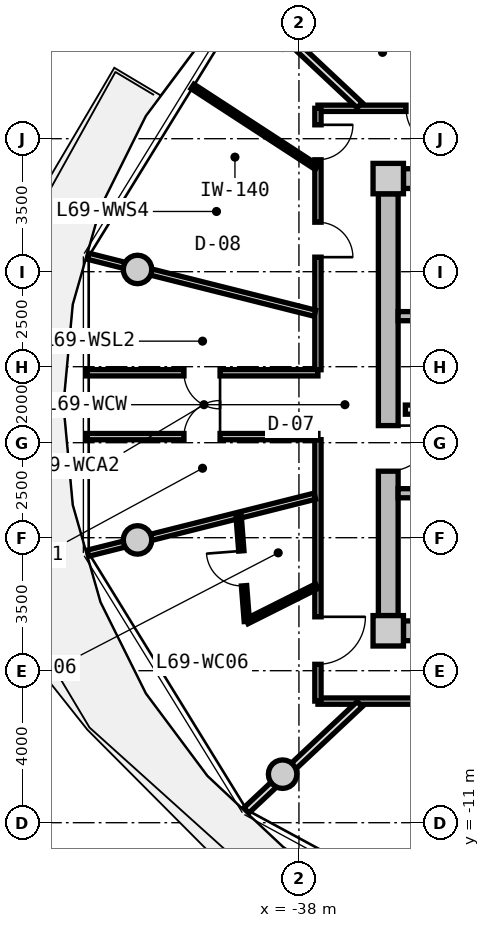
"""IFC4 building model, lengths in metres.
Left out: names, types, materials, properties, quantities, classifications, styles, units other than length and angle.
Written with IfcOpenShell. Run it as: python <this file> out.ifc"""

import sys

from ifc_helpers import new_model, si_unit, direction, frame, frame_2d, origin, origin_2d, place, context, subcontext, project, spatial, rectangle, circle, extrude, source, transform, mapped, element, fill, save


model = new_model("IFC4")
c1 = context("Model", 3, precision=1e-05, world=origin(), true_north=direction((0.0, 1.0)))
c2 = subcontext(c1, "Body", "Model", "MODEL_VIEW")
j1 = project(units=[si_unit("LENGTHUNIT", "METRE"), si_unit("PLANEANGLEUNIT", "RADIAN")], contexts=[c1])
p1 = place(None, origin())
s1 = spatial("IfcSite", under=j1, at=p1, CompositionType="ELEMENT")
p2 = place(p1, origin())
s2 = spatial("IfcBuilding", under=s1, at=p2, CompositionType="ELEMENT")
p3 = place(p2, frame((0.0, 0.0, 223.05)))
s3 = spatial("IfcBuildingStorey", under=s2, at=p3, CompositionType="ELEMENT", Elevation=223.05)
m1 = source(origin(), c2, "Body", "SweptSolid", [
    extrude(rectangle(XDim=0.8, YDim=0.8, at=origin_2d()), origin(), (0.0, 0.0, 1.0), 3.05),
])
for number, where, z_axis, x_axis in (
    (1, (-35.65, -5.95, 0.0), (0.0, 0.0, 1.0), (1.0, 0.0, 0.0)),
    (2, (-35.65, 5.95, 0.0), (0.0, 0.0, 1.0), (1.0, 0.0, 0.0)),
):
    element("IfcColumn", number, at=place(p3, frame(where, z_axis=z_axis, x_axis=x_axis)), inside=s3, PredefinedType="COLUMN", context=c2, shape_type="MappedRepresentation", body=[
        mapped(m1, transform((0.0, 0.0, 0.0), x_axis=(1.0, 0.0, 0.0), y_axis=(0.0, 1.0, 0.0), z_axis=(0.0, 0.0, 1.0), scale=1.0)),
    ])
m2 = source(origin(), c2, "Body", "SweptSolid", [
    extrude(rectangle(XDim=14.5, YDim=0.52, at=frame_2d((7.25, 0.0))), origin(), (0.0, 0.0, 1.0), 2.76),
])
for number, where, z_axis, x_axis in (
    (3, (-35.25, 5.95, 0.0), (0.0, 0.0, 1.0), (1.0, 0.0, 0.0)),
    (4, (-20.75, -5.95, 0.0), (0.0, 0.0, 1.0), (-1.0, 0.0, 0.0)),
):
    element("IfcWall", number, at=place(p3, frame(where, z_axis=z_axis, x_axis=x_axis)), inside=s3, PredefinedType="SHEAR", context=c2, shape_type="MappedRepresentation", body=[
        mapped(m2, transform((0.0, 0.0, 0.0), x_axis=(1.0, 0.0, 0.0), y_axis=(0.0, 1.0, 0.0), z_axis=(0.0, 0.0, 1.0), scale=1.0)),
    ])
m3 = source(origin(), c2, "Body", "SweptSolid", [
    extrude(rectangle(XDim=11.1, YDim=0.52, at=frame_2d((5.55, 0.0))), origin(), (0.0, 0.0, 1.0), 2.76),
])
p4 = place(p3, frame((-35.65, -5.55, 0.0), z_axis=(0.0, 0.0, 1.0), x_axis=(0.0, 1.0, 0.0)))
e5 = element("IfcWall", 5, at=p4, inside=s3, PredefinedType="SHEAR", context=c2, shape_type="MappedRepresentation", body=[
    mapped(m3, transform((0.0, 0.0, 0.0), x_axis=(1.0, 0.0, 0.0), y_axis=(0.0, 1.0, 0.0), z_axis=(0.0, 0.0, 1.0), scale=1.0)),
])
p5 = place(p4, frame((3.8, 0.0, 0.0)))
e6 = element("IfcOpeningElement", 6, at=p5, cuts=e5, PredefinedType="OPENING", context=c2, shape_type="SweptSolid", body=[
    extrude(rectangle(XDim=1.2, YDim=2.15, at=frame_2d((0.6, 1.075))), frame((0.0, 0.27, 0.0), z_axis=(0.0, -1.0, 0.0), x_axis=(1.0, 0.0, 0.0)), (0.0, 0.0, 1.0), 0.54),
])
m4 = source(origin(), c2, "Body", "SweptSolid", [
    extrude(circle(Radius=0.375, at=origin_2d()), origin(), (0.0, 0.0, 1.0), 3.05),
])
for number, where, z_axis, x_axis in (
    (7, (-42.247, 3.559, 0.0), (0.0, 0.0, 1.0), (1.0, 0.0, 0.0)),
    (8, (-42.247, -3.559, 0.0), (0.0, 0.0, 1.0), (1.0, 0.0, 0.0)),
    (9, (-38.43, -9.723, 0.0), (0.0, 0.0, 1.0), (1.0, 0.0, 0.0)),
):
    element("IfcColumn", number, at=place(p3, frame(where, z_axis=z_axis, x_axis=x_axis)), inside=s3, PredefinedType="COLUMN", context=c2, shape_type="MappedRepresentation", body=[
        mapped(m4, transform((0.0, 0.0, 0.0), x_axis=(1.0, 0.0, 0.0), y_axis=(0.0, 1.0, 0.0), z_axis=(0.0, 0.0, 1.0), scale=1.0)),
    ])
m5 = source(origin(), c2, "Body", "SweptSolid", [
    extrude(rectangle(XDim=7.93, YDim=0.24, at=frame_2d((3.965, 0.0))), origin(), (0.0, 0.0, 1.0), 2.76),
])
p6 = place(p3, frame((-35.39, 2.33, 0.0), z_axis=(0.0, 0.0, 1.0), x_axis=(1.0, 0.0, 0.0)))
e10 = element("IfcWall", 10, at=p6, inside=s3, PredefinedType="PARTITIONING", context=c2, shape_type="MappedRepresentation", body=[
    mapped(m5, transform((0.0, 0.0, 0.0), x_axis=(1.0, 0.0, 0.0), y_axis=(0.0, 1.0, 0.0), z_axis=(0.0, 0.0, 1.0), scale=1.0)),
])
p7 = place(p3, frame((-35.39, -2.33, 0.0), z_axis=(0.0, 0.0, 1.0), x_axis=(1.0, 0.0, 0.0)))
e11 = element("IfcWall", 11, at=p7, inside=s3, PredefinedType="PARTITIONING", context=c2, shape_type="MappedRepresentation", body=[
    mapped(m5, transform((0.0, 0.0, 0.0), x_axis=(1.0, 0.0, 0.0), y_axis=(0.0, 1.0, 0.0), z_axis=(0.0, 0.0, 1.0), scale=1.0)),
])
p8 = place(p7, frame((1.05, 0.0, 0.0)))
e12 = element("IfcOpeningElement", 12, at=p8, cuts=e11, PredefinedType="OPENING", context=c2, shape_type="SweptSolid", body=[
    extrude(rectangle(XDim=1.1, YDim=2.15, at=frame_2d((0.55, 1.075))), frame((0.0, 0.13, 0.0), z_axis=(0.0, -1.0, 0.0), x_axis=(1.0, 0.0, 0.0)), (0.0, 0.0, 1.0), 0.26),
])
m6 = source(origin(), c2, "Body", "SweptSolid", [
    extrude(rectangle(XDim=7.62, YDim=0.24, at=frame_2d((3.81, 0.0))), origin(), (0.0, 0.0, 1.0), 2.745),
])
p9 = place(p3, frame((-35.2, -0.13, 0.0), z_axis=(0.0, 0.0, 1.0), x_axis=(1.0, 0.0, 0.0)))
e13 = element("IfcWall", 13, at=p9, inside=s3, PredefinedType="PARTITIONING", context=c2, shape_type="MappedRepresentation", body=[
    mapped(m6, transform((0.0, 0.0, 0.0), x_axis=(1.0, 0.0, 0.0), y_axis=(0.0, 1.0, 0.0), z_axis=(0.0, 0.0, 1.0), scale=1.0)),
])
p10 = place(p9, frame((6.22, 0.0, 0.0)))
e14 = element("IfcOpeningElement", 14, at=p10, cuts=e13, PredefinedType="OPENING", context=c2, shape_type="SweptSolid", body=[
    extrude(rectangle(XDim=1.0, YDim=2.1, at=frame_2d((0.5, 1.05))), frame((0.0, 0.13, 0.0), z_axis=(0.0, -1.0, 0.0), x_axis=(1.0, 0.0, 0.0)), (0.0, 0.0, 1.0), 0.26),
])
p11 = place(p9, frame((2.4, 0.0, 0.0)))
e15 = element("IfcOpeningElement", 15, at=p11, cuts=e13, PredefinedType="OPENING", context=c2, shape_type="SweptSolid", body=[
    extrude(rectangle(XDim=1.0, YDim=2.1, at=frame_2d((0.5, 1.05))), frame((0.0, 0.13, 0.0), z_axis=(0.0, -1.0, 0.0), x_axis=(1.0, 0.0, 0.0)), (0.0, 0.0, 1.0), 0.26),
])
m7 = source(origin(), c2, "Body", "SweptSolid", [
    extrude(rectangle(XDim=8.58, YDim=0.165, at=frame_2d((4.29, 0.0))), origin(), (0.0, 0.0, 1.0), 2.745),
])
p12 = place(p3, frame((-37.5, 7.8, 0.0), z_axis=(0.0, 0.0, 1.0), x_axis=(1.0, 0.0, 0.0)))
e16 = element("IfcWall", 16, at=p12, inside=s3, PredefinedType="PARTITIONING", context=c2, shape_type="MappedRepresentation", body=[
    mapped(m7, transform((0.0, 0.0, 0.0), x_axis=(1.0, 0.0, 0.0), y_axis=(0.0, 1.0, 0.0), z_axis=(0.0, 0.0, 1.0), scale=1.0)),
])
p13 = place(p12, frame((5.408, 0.0, 0.0)))
e17 = element("IfcOpeningElement", 17, at=p13, cuts=e16, PredefinedType="OPENING", context=c2, shape_type="SweptSolid", body=[
    extrude(rectangle(XDim=1.05, YDim=2.15, at=frame_2d((0.525, 1.075))), frame((0.0, 0.093, 0.0), z_axis=(0.0, -1.0, 0.0), x_axis=(1.0, 0.0, 0.0)), (0.0, 0.0, 1.0), 0.185),
])
p14 = place(p12, frame((2.317, 0.0, 0.0)))
e18 = element("IfcOpeningElement", 18, at=p14, cuts=e16, PredefinedType="OPENING", context=c2, shape_type="SweptSolid", body=[
    extrude(rectangle(XDim=1.05, YDim=2.15, at=frame_2d((0.525, 1.075))), frame((0.0, 0.093, 0.0), z_axis=(0.0, -1.0, 0.0), x_axis=(1.0, 0.0, 0.0)), (0.0, 0.0, 1.0), 0.185),
])
m8 = source(origin(), c2, "Body", "SweptSolid", [
    extrude(rectangle(XDim=19.0, YDim=0.165, at=frame_2d((9.5, 0.0))), origin(), (0.0, 0.0, 1.0), 2.745),
])
p15 = place(p3, frame((-18.5, -7.8, 0.0), z_axis=(0.0, 0.0, 1.0), x_axis=(-1.0, 0.0, 0.0)))
e19 = element("IfcWall", 19, at=p15, inside=s3, PredefinedType="PARTITIONING", context=c2, shape_type="MappedRepresentation", body=[
    mapped(m8, transform((0.0, 0.0, 0.0), x_axis=(1.0, 0.0, 0.0), y_axis=(0.0, 1.0, 0.0), z_axis=(0.0, 0.0, 1.0), scale=1.0)),
])
p16 = place(p15, frame((14.191, 0.0, 0.0)))
e20 = element("IfcOpeningElement", 20, at=p16, cuts=e19, PredefinedType="OPENING", context=c2, shape_type="SweptSolid", body=[
    extrude(rectangle(XDim=1.25, YDim=2.2, at=frame_2d((0.625, 1.1))), frame((0.0, 0.093, 0.0), z_axis=(0.0, -1.0, 0.0), x_axis=(1.0, 0.0, 0.0)), (0.0, 0.0, 1.0), 0.185),
])
p17 = place(p15, frame((8.875, 0.0, 0.0)))
e21 = element("IfcOpeningElement", 21, at=p17, cuts=e19, PredefinedType="OPENING", context=c2, shape_type="SweptSolid", body=[
    extrude(rectangle(XDim=1.25, YDim=2.2, at=frame_2d((0.625, 1.1))), frame((0.0, 0.093, 0.0), z_axis=(0.0, -1.0, 0.0), x_axis=(1.0, 0.0, 0.0)), (0.0, 0.0, 1.0), 0.185),
])
p18 = place(p15, frame((3.559, 0.0, 0.0)))
e22 = element("IfcOpeningElement", 22, at=p18, cuts=e19, PredefinedType="OPENING", context=c2, shape_type="SweptSolid", body=[
    extrude(rectangle(XDim=1.25, YDim=2.2, at=frame_2d((0.625, 1.1))), frame((0.0, 0.093, 0.0), z_axis=(0.0, -1.0, 0.0), x_axis=(1.0, 0.0, 0.0)), (0.0, 0.0, 1.0), 0.185),
])
m9 = source(origin(), c2, "Body", "SweptSolid", [
    extrude(rectangle(XDim=6.88, YDim=0.165, at=frame_2d((3.44, 0.0))), origin(), (0.0, 0.0, 1.0), 2.745),
])
p19 = place(p3, frame((-37.5, -7.8, 0.0), z_axis=(0.0, 0.0, 1.0), x_axis=(0.0, 1.0, 0.0)))
e23 = element("IfcWall", 23, at=p19, inside=s3, PredefinedType="PARTITIONING", context=c2, shape_type="MappedRepresentation", body=[
    mapped(m9, transform((0.0, 0.0, 0.0), x_axis=(1.0, 0.0, 0.0), y_axis=(0.0, 1.0, 0.0), z_axis=(0.0, 0.0, 1.0), scale=1.0)),
])
p20 = place(p19, frame((0.968, 0.0, 0.0)))
e24 = element("IfcOpeningElement", 24, at=p20, cuts=e23, PredefinedType="OPENING", context=c2, shape_type="SweptSolid", body=[
    extrude(rectangle(XDim=1.25, YDim=2.2, at=frame_2d((0.625, 1.1))), frame((0.0, 0.093, 0.0), z_axis=(0.0, -1.0, 0.0), x_axis=(1.0, 0.0, 0.0)), (0.0, 0.0, 1.0), 0.185),
])
p21 = place(p3, frame((-37.5, 0.92, 0.0), z_axis=(0.0, 0.0, 1.0), x_axis=(0.0, 1.0, 0.0)))
e25 = element("IfcWall", 25, at=p21, inside=s3, PredefinedType="PARTITIONING", context=c2, shape_type="MappedRepresentation", body=[
    mapped(m9, transform((0.0, 0.0, 0.0), x_axis=(1.0, 0.0, 0.0), y_axis=(0.0, 1.0, 0.0), z_axis=(0.0, 0.0, 1.0), scale=1.0)),
])
p22 = place(p21, frame((5.525, 0.0, 0.0)))
e26 = element("IfcOpeningElement", 26, at=p22, cuts=e25, PredefinedType="OPENING", context=c2, shape_type="SweptSolid", body=[
    extrude(rectangle(XDim=0.92, YDim=2.1, at=frame_2d((0.46, 1.05))), frame((0.0, 0.093, 0.0), z_axis=(0.0, -1.0, 0.0), x_axis=(1.0, 0.0, 0.0)), (0.0, 0.0, 1.0), 0.185),
])
p23 = place(p21, frame((2.962, 0.0, 0.0)))
e27 = element("IfcOpeningElement", 27, at=p23, cuts=e25, PredefinedType="OPENING", context=c2, shape_type="SweptSolid", body=[
    extrude(rectangle(XDim=0.92, YDim=2.1, at=frame_2d((0.46, 1.05))), frame((0.0, 0.093, 0.0), z_axis=(0.0, -1.0, 0.0), x_axis=(1.0, 0.0, 0.0)), (0.0, 0.0, 1.0), 0.185),
])
m10 = source(origin(), c2, "Body", "SweptSolid", [
    extrude(rectangle(XDim=6.157, YDim=0.165, at=frame_2d((3.079, 0.0))), origin(), (0.0, 0.0, 1.0), 2.345),
])
for number, where, z_axis, x_axis in (
    (28, (-37.58, 2.407, 0.0), (0.0, 0.0, 1.0), (-0.97, 0.244, 0.0)),
    (29, (-37.58, -2.407, 0.0), (0.0, 0.0, 1.0), (-0.97, -0.244, 0.0)),
):
    element("IfcWall", number, at=place(p3, frame(where, z_axis=z_axis, x_axis=x_axis)), inside=s3, PredefinedType="PARTITIONING", context=c2, shape_type="MappedRepresentation", body=[
        mapped(m10, transform((0.0, 0.0, 0.0), x_axis=(1.0, 0.0, 0.0), y_axis=(0.0, 1.0, 0.0), z_axis=(0.0, 0.0, 1.0), scale=1.0)),
    ])
m11 = source(origin(), c2, "Body", "SweptSolid", [
    extrude(rectangle(XDim=6.101, YDim=0.165, at=frame_2d((3.051, 0.0))), origin(), (0.0, 0.0, 1.0), 2.745),
])
p24 = place(p3, frame((-43.601, 0.84, 0.0), z_axis=(0.0, 0.0, 1.0), x_axis=(1.0, 0.0, 0.0)))
e30 = element("IfcWall", 30, at=p24, inside=s3, PredefinedType="PARTITIONING", context=c2, shape_type="MappedRepresentation", body=[
    mapped(m11, transform((0.0, 0.0, 0.0), x_axis=(1.0, 0.0, 0.0), y_axis=(0.0, 1.0, 0.0), z_axis=(0.0, 0.0, 1.0), scale=1.0)),
])
p25 = place(p24, frame((2.576, 0.0, 0.0)))
e31 = element("IfcOpeningElement", 31, at=p25, cuts=e30, PredefinedType="OPENING", context=c2, shape_type="SweptSolid", body=[
    extrude(rectangle(XDim=0.95, YDim=2.1, at=frame_2d((0.475, 1.05))), frame((0.0, 0.093, 0.0), z_axis=(0.0, -1.0, 0.0), x_axis=(1.0, 0.0, 0.0)), (0.0, 0.0, 1.0), 0.185),
])
p26 = place(p3, frame((-37.5, -0.84, 0.0), z_axis=(0.0, 0.0, 1.0), x_axis=(-1.0, 0.0, 0.0)))
e32 = element("IfcWall", 32, at=p26, inside=s3, PredefinedType="PARTITIONING", context=c2, shape_type="MappedRepresentation", body=[
    mapped(m11, transform((0.0, 0.0, 0.0), x_axis=(1.0, 0.0, 0.0), y_axis=(0.0, 1.0, 0.0), z_axis=(0.0, 0.0, 1.0), scale=1.0)),
])
p27 = place(p26, frame((2.576, 0.0, 0.0)))
e33 = element("IfcOpeningElement", 33, at=p27, cuts=e32, PredefinedType="OPENING", context=c2, shape_type="SweptSolid", body=[
    extrude(rectangle(XDim=0.95, YDim=2.1, at=frame_2d((0.475, 1.05))), frame((0.0, 0.093, 0.0), z_axis=(0.0, -1.0, 0.0), x_axis=(1.0, 0.0, 0.0)), (0.0, 0.0, 1.0), 0.185),
])
m12 = source(origin(), c2, "Body", "SweptSolid", [
    extrude(rectangle(XDim=4.089, YDim=0.19, at=frame_2d((2.044, 0.0))), origin(), (0.0, 0.0, 1.0), 2.345),
])
p28 = place(p3, frame((-36.402, 7.88, 0.0), z_axis=(0.0, 0.0, 1.0), x_axis=(-0.729401273609, 0.684086092577, 0.0)))
e34 = element("IfcWall", 34, at=p28, inside=s3, PredefinedType="PARTITIONING", context=c2, shape_type="MappedRepresentation", body=[
    mapped(m12, transform((0.0, 0.0, 0.0), x_axis=(1.0, 0.0, 0.0), y_axis=(0.0, 1.0, 0.0), z_axis=(0.0, 0.0, 1.0), scale=1.0)),
])
m13 = source(origin(), c2, "Body", "SweptSolid", [
    extrude(rectangle(XDim=5.652, YDim=0.19, at=frame_2d((2.826, 0.0))), origin(), (0.0, 0.0, 1.0), 2.745),
])
p29 = place(p3, frame((-32.794, 7.83, 0.0), z_axis=(0.0, 0.0, 1.0), x_axis=(-0.527566076956, 0.84951399897, 0.0)))
e35 = element("IfcWall", 35, at=p29, inside=s3, PredefinedType="PARTITIONING", context=c2, shape_type="MappedRepresentation", body=[
    mapped(m13, transform((0.0, 0.0, 0.0), x_axis=(1.0, 0.0, 0.0), y_axis=(0.0, 1.0, 0.0), z_axis=(0.0, 0.0, 1.0), scale=1.0)),
])
m14 = source(origin(), c2, "Body", "SweptSolid", [
    extrude(rectangle(XDim=3.904, YDim=0.14, at=frame_2d((1.952, 0.0))), origin(), (0.0, 0.0, 1.0), 2.745),
])
p30 = place(p3, frame((-37.53, 6.246, 0.0), z_axis=(0.0, 0.0, 1.0), x_axis=(-0.838024687996, 0.545632314209, 0.0)))
e36 = element("IfcWall", 36, at=p30, inside=s3, PredefinedType="PARTITIONING", context=c2, shape_type="MappedRepresentation", body=[
    mapped(m14, transform((0.0, 0.0, 0.0), x_axis=(1.0, 0.0, 0.0), y_axis=(0.0, 1.0, 0.0), z_axis=(0.0, 0.0, 1.0), scale=1.0)),
])
p31 = place(p3, frame((-36.402, -7.88, 0.0), z_axis=(0.0, 0.0, 1.0), x_axis=(-0.729401273609, -0.684086092577, 0.0)))
e37 = element("IfcWall", 37, at=p31, inside=s3, PredefinedType="PARTITIONING", context=c2, shape_type="MappedRepresentation", body=[
    mapped(m12, transform((0.0, 0.0, 0.0), x_axis=(1.0, 0.0, 0.0), y_axis=(0.0, 1.0, 0.0), z_axis=(0.0, 0.0, 1.0), scale=1.0)),
])
m15 = source(origin(), c2, "Body", "SweptSolid", [
    extrude(rectangle(XDim=2.06, YDim=0.14, at=frame_2d((1.03, 0.0))), origin(), (0.0, 0.0, 1.0), 2.745),
])
p32 = place(p3, frame((-37.53, -4.778, 0.0), z_axis=(0.0, 0.0, 1.0), x_axis=(-0.893952568722, -0.448161583444, 0.0)))
e38 = element("IfcWall", 38, at=p32, inside=s3, PredefinedType="PARTITIONING", context=c2, shape_type="MappedRepresentation", body=[
    mapped(m15, transform((0.0, 0.0, 0.0), x_axis=(1.0, 0.0, 0.0), y_axis=(0.0, 1.0, 0.0), z_axis=(0.0, 0.0, 1.0), scale=1.0)),
])
m16 = source(origin(), c2, "Body", "SweptSolid", [
    extrude(rectangle(XDim=2.798, YDim=0.14, at=frame_2d((1.399, 0.0))), origin(), (0.0, 0.0, 1.0), 2.745),
])
p33 = place(p3, frame((-39.371, -5.701, 0.0), z_axis=(0.0, 0.0, 1.0), x_axis=(-0.077823984089, 0.996967114553, 0.0)))
e39 = element("IfcWall", 39, at=p33, inside=s3, PredefinedType="PARTITIONING", context=c2, shape_type="MappedRepresentation", body=[
    mapped(m16, transform((0.0, 0.0, 0.0), x_axis=(1.0, 0.0, 0.0), y_axis=(0.0, 1.0, 0.0), z_axis=(0.0, 0.0, 1.0), scale=1.0)),
])
p34 = place(p33, frame((0.939, 0.0, 0.0)))
e40 = element("IfcOpeningElement", 40, at=p34, cuts=e39, PredefinedType="OPENING", context=c2, shape_type="SweptSolid", body=[
    extrude(rectangle(XDim=0.92, YDim=2.1, at=frame_2d((0.46, 1.05))), frame((0.0, 0.08, 0.0), z_axis=(0.0, -1.0, 0.0), x_axis=(1.0, 0.0, 0.0)), (0.0, 0.0, 1.0), 0.16),
])
m17 = source(origin(), c2, "Body", "SweptSolid", [
    extrude(rectangle(XDim=1.2, YDim=2.15, at=frame_2d((0.6, 1.075))), frame((0.0, 0.025, 0.0), z_axis=(0.0, -1.0, 0.0), x_axis=(1.0, 0.0, 0.0)), (0.0, 0.0, 1.0), 0.05),
])
p35 = place(p5, frame((1.2, 0.0, 0.0), z_axis=(0.0, 0.0, 1.0), x_axis=(-1.0, 0.0, 0.0)))
e41 = element("IfcDoor", 41, at=p35, inside=s3, OperationType="SINGLE_SWING_LEFT", PredefinedType="DOOR", context=c2, shape_type="MappedRepresentation", body=[
    mapped(m17, transform((0.0, 0.0, 0.0), x_axis=(1.0, 0.0, 0.0), y_axis=(0.0, 1.0, 0.0), z_axis=(0.0, 0.0, 1.0), scale=1.0)),
])
fill(e6, e41)
m18 = source(origin(), c2, "Body", "SweptSolid", [
    extrude(rectangle(XDim=0.95, YDim=2.1, at=frame_2d((0.475, 1.05))), frame((0.0, 0.025, 0.0), z_axis=(0.0, -1.0, 0.0), x_axis=(1.0, 0.0, 0.0)), (0.0, 0.0, 1.0), 0.05),
])
p36 = place(p27, frame((0.95, 0.0, 0.0), z_axis=(0.0, 0.0, 1.0), x_axis=(-1.0, 0.0, 0.0)))
e42 = element("IfcDoor", 42, at=p36, inside=s3, OperationType="SINGLE_SWING_RIGHT", PredefinedType="DOOR", context=c2, shape_type="MappedRepresentation", body=[
    mapped(m18, transform((0.0, 0.0, 0.0), x_axis=(1.0, 0.0, 0.0), y_axis=(0.0, 1.0, 0.0), z_axis=(0.0, 0.0, 1.0), scale=1.0)),
])
fill(e33, e42)
p37 = place(p25, frame((0.95, 0.0, 0.0), z_axis=(0.0, 0.0, 1.0), x_axis=(-1.0, 0.0, 0.0)))
e43 = element("IfcDoor", 43, at=p37, inside=s3, OperationType="SINGLE_SWING_LEFT", PredefinedType="DOOR", context=c2, shape_type="MappedRepresentation", body=[
    mapped(m18, transform((0.0, 0.0, 0.0), x_axis=(1.0, 0.0, 0.0), y_axis=(0.0, 1.0, 0.0), z_axis=(0.0, 0.0, 1.0), scale=1.0)),
])
fill(e31, e43)
m19 = source(origin(), c2, "Body", "SweptSolid", [
    extrude(rectangle(XDim=1.05, YDim=2.15, at=frame_2d((0.525, 1.075))), frame((0.0, 0.025, 0.0), z_axis=(0.0, -1.0, 0.0), x_axis=(1.0, 0.0, 0.0)), (0.0, 0.0, 1.0), 0.05),
])
p38 = place(p14, frame((1.05, 0.0, 0.0), z_axis=(0.0, 0.0, 1.0), x_axis=(-1.0, 0.0, 0.0)))
e44 = element("IfcDoor", 44, at=p38, inside=s3, OperationType="SINGLE_SWING_LEFT", PredefinedType="DOOR", context=c2, shape_type="MappedRepresentation", body=[
    mapped(m19, transform((0.0, 0.0, 0.0), x_axis=(1.0, 0.0, 0.0), y_axis=(0.0, 1.0, 0.0), z_axis=(0.0, 0.0, 1.0), scale=1.0)),
])
fill(e18, e44)
m20 = source(origin(), c2, "Body", "SweptSolid", [
    extrude(rectangle(XDim=0.92, YDim=2.1, at=frame_2d((0.46, 1.05))), frame((0.0, 0.025, 0.0), z_axis=(0.0, -1.0, 0.0), x_axis=(1.0, 0.0, 0.0)), (0.0, 0.0, 1.0), 0.05),
])
p39 = place(p22, frame((0.92, 0.0, 0.0), z_axis=(0.0, 0.0, 1.0), x_axis=(-1.0, 0.0, 0.0)))
e45 = element("IfcDoor", 45, at=p39, inside=s3, OperationType="SINGLE_SWING_LEFT", PredefinedType="DOOR", context=c2, shape_type="MappedRepresentation", body=[
    mapped(m20, transform((0.0, 0.0, 0.0), x_axis=(1.0, 0.0, 0.0), y_axis=(0.0, 1.0, 0.0), z_axis=(0.0, 0.0, 1.0), scale=1.0)),
])
fill(e26, e45)
p40 = place(p23, frame((0.92, 0.0, 0.0), z_axis=(0.0, 0.0, 1.0), x_axis=(-1.0, 0.0, 0.0)))
e46 = element("IfcDoor", 46, at=p40, inside=s3, OperationType="SINGLE_SWING_RIGHT", PredefinedType="DOOR", context=c2, shape_type="MappedRepresentation", body=[
    mapped(m20, transform((0.0, 0.0, 0.0), x_axis=(1.0, 0.0, 0.0), y_axis=(0.0, 1.0, 0.0), z_axis=(0.0, 0.0, 1.0), scale=1.0)),
])
fill(e27, e46)
m21 = source(origin(), c2, "Body", "SweptSolid", [
    extrude(rectangle(XDim=1.25, YDim=2.2, at=frame_2d((0.625, 1.1))), frame((0.0, 0.025, 0.0), z_axis=(0.0, -1.0, 0.0), x_axis=(1.0, 0.0, 0.0)), (0.0, 0.0, 1.0), 0.05),
])
p41 = place(p20, frame((1.25, 0.0, 0.0), z_axis=(0.0, 0.0, 1.0), x_axis=(-1.0, 0.0, 0.0)))
e47 = element("IfcDoor", 47, at=p41, inside=s3, OperationType="SINGLE_SWING_LEFT", PredefinedType="DOOR", context=c2, shape_type="MappedRepresentation", body=[
    mapped(m21, transform((0.0, 0.0, 0.0), x_axis=(1.0, 0.0, 0.0), y_axis=(0.0, 1.0, 0.0), z_axis=(0.0, 0.0, 1.0), scale=1.0)),
])
fill(e24, e47)
p42 = place(p34, origin())
e48 = element("IfcDoor", 48, at=p42, inside=s3, OperationType="SINGLE_SWING_RIGHT", PredefinedType="DOOR", context=c2, shape_type="MappedRepresentation", body=[
    mapped(m20, transform((0.0, 0.0, 0.0), x_axis=(1.0, 0.0, 0.0), y_axis=(0.0, 1.0, 0.0), z_axis=(0.0, 0.0, 1.0), scale=1.0)),
])
fill(e40, e48)
save(model, sys.argv[1])
